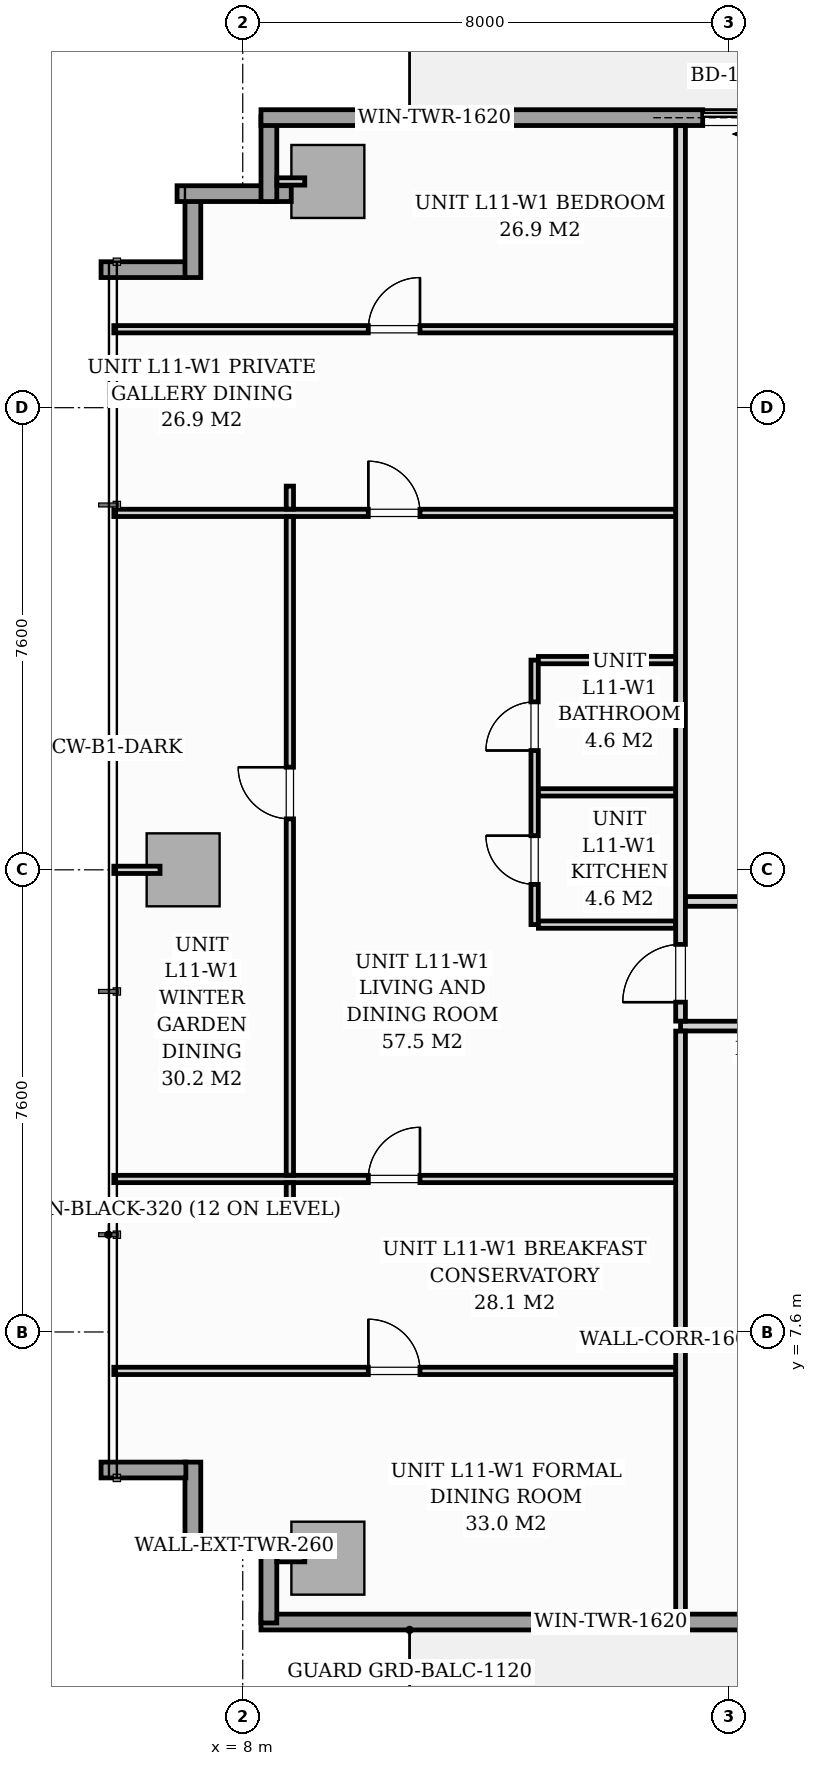
"""IFC4 building model, lengths in metres.
Left out: names, types, materials, properties, quantities, classifications, styles, units other than length and angle.
Written with IfcOpenShell. Run it as: python <this file> out.ifc"""

import sys

from ifc_helpers import new_model, si_unit, direction, frame, frame_2d, origin, origin_2d, place, context, subcontext, project, spatial, rectangle, extrude, source, transform, mapped, element, fill, save


model = new_model("IFC4")
c1 = context("Model", 3, precision=1e-05, world=origin(), true_north=direction((0.0, 1.0)))
c2 = subcontext(c1, "Body", "Model", "MODEL_VIEW")
j1 = project(units=[si_unit("LENGTHUNIT", "METRE"), si_unit("PLANEANGLEUNIT", "RADIAN")], contexts=[c1])
p1 = place(None, origin())
s1 = spatial("IfcSite", under=j1, at=p1, CompositionType="ELEMENT")
p2 = place(p1, origin())
s2 = spatial("IfcBuilding", under=s1, at=p2, CompositionType="ELEMENT")
p3 = place(p2, frame((0.0, 0.0, 42.2)))
s3 = spatial("IfcBuildingStorey", under=s2, at=p3, CompositionType="ELEMENT", Elevation=42.2)
m1 = source(origin(), c2, "Body", "SweptSolid", [
    extrude(rectangle(XDim=1.2, YDim=1.2, at=origin_2d()), origin(), (0.0, 0.0, 1.0), 3.196),
])
for number, where, z_axis, x_axis in (
    (1, (9.4, 3.88, 0.002), (0.0, 0.0, 1.0), (1.0, 0.0, 0.0)),
    (2, (9.4, 26.52, 0.002), (0.0, 0.0, 1.0), (1.0, 0.0, 0.0)),
    (3, (7.02, 15.2, 0.002), (0.0, 0.0, 1.0), (1.0, 0.0, 0.0)),
):
    element("IfcColumn", number, at=place(p3, frame(where, z_axis=z_axis, x_axis=x_axis)), inside=s3, PredefinedType="COLUMN", context=c2, shape_type="MappedRepresentation", body=[
        mapped(m1, transform((0.0, 0.0, 0.0), scale=1.0)),
    ])
p4 = place(p3, frame((8.798, 4.08, 0.0), z_axis=(0.0, 0.0, 1.0), x_axis=(-1.0, 0.0, 0.0)))
e4 = element("IfcWall", 4, at=p4, inside=s3, PredefinedType="STANDARD", context=c2, shape_type="SweptSolid", body=[
    extrude(rectangle(XDim=1.878, YDim=0.26, at=frame_2d((0.939, 0.0))), origin(), (0.0, 0.0, 1.0), 2.94),
])
for number, where, z_axis, x_axis in (
    (5, (7.18, 4.065, 0.0), (0.0, 0.0, 1.0), (0.0, 1.0, 0.0)),
    (6, (7.065, 5.33, 0.0), (0.0, 0.0, 1.0), (-1.0, 0.0, 0.0)),
    (7, (5.67, 25.07, 0.0), (0.0, 0.0, 1.0), (1.0, 0.0, 0.0)),
    (8, (7.18, 24.94, 0.0), (0.0, 0.0, 1.0), (0.0, 1.0, 0.0)),
):
    element("IfcWall", number, at=place(p3, frame(where, z_axis=z_axis, x_axis=x_axis)), inside=s3, PredefinedType="STANDARD", context=c2, shape_type="SweptSolid", body=[
        extrude(rectangle(XDim=1.395, YDim=0.26, at=frame_2d((0.698, 0.0))), origin(), (0.0, 0.0, 1.0), 2.94),
    ])
p5 = place(p3, frame((6.92, 26.32, 0.0), z_axis=(0.0, 0.0, 1.0), x_axis=(1.0, 0.0, 0.0)))
e9 = element("IfcWall", 9, at=p5, inside=s3, PredefinedType="STANDARD", context=c2, shape_type="SweptSolid", body=[
    extrude(rectangle(XDim=1.878, YDim=0.26, at=frame_2d((0.939, 0.0))), origin(), (0.0, 0.0, 1.0), 2.94),
])
p6 = place(p3, frame((8.43, 26.19, 0.0), z_axis=(0.0, 0.0, 1.0), x_axis=(0.0, 1.0, 0.0)))
e10 = element("IfcWall", 10, at=p6, inside=s3, PredefinedType="STANDARD", context=c2, shape_type="SweptSolid", body=[
    extrude(rectangle(XDim=1.395, YDim=0.26, at=frame_2d((0.698, 0.0))), origin(), (0.0, 0.0, 1.0), 2.94),
])
p7 = place(p3, frame((8.3, 27.57, 0.0), z_axis=(0.0, 0.0, 1.0), x_axis=(1.0, 0.0, 0.0)))
e11 = element("IfcWall", 11, at=p7, inside=s3, PredefinedType="STANDARD", context=c2, shape_type="SweptSolid", body=[
    extrude(rectangle(XDim=17.15, YDim=0.26, at=frame_2d((8.575, 0.0))), origin(), (0.0, 0.0, 1.0), 2.94),
])
p8 = place(p7, frame((7.264, 0.0, 0.0)))
e12 = element("IfcOpeningElement", 12, at=p8, cuts=e11, PredefinedType="OPENING", context=c2, shape_type="SweptSolid", body=[
    extrude(rectangle(XDim=1.8, YDim=2.06, at=frame_2d((0.9, 1.03))), frame((0.0, 0.14, 0.0), z_axis=(0.0, -1.0, 0.0), x_axis=(1.0, 0.0, 0.0)), (0.0, 0.0, 1.0), 0.28),
])
p9 = place(p7, frame((2.05, 0.0, 0.65)))
e13 = element("IfcOpeningElement", 13, at=p9, cuts=e11, PredefinedType="OPENING", context=c2, shape_type="SweptSolid", body=[
    extrude(rectangle(XDim=1.6, YDim=1.5, at=frame_2d((0.8, 0.75))), frame((0.0, 0.14, 0.0), z_axis=(0.0, -1.0, 0.0), x_axis=(1.0, 0.0, 0.0)), (0.0, 0.0, 1.0), 0.28),
])
p10 = place(p3, frame((25.45, 2.83, 0.0), z_axis=(0.0, 0.0, 1.0), x_axis=(-1.0, 0.0, 0.0)))
e14 = element("IfcWall", 14, at=p10, inside=s3, PredefinedType="STANDARD", context=c2, shape_type="SweptSolid", body=[
    extrude(rectangle(XDim=17.15, YDim=0.26, at=frame_2d((8.575, 0.0))), origin(), (0.0, 0.0, 1.0), 2.94),
])
p11 = place(p10, frame((6.65, 0.0, 0.0)))
e15 = element("IfcOpeningElement", 15, at=p11, cuts=e14, PredefinedType="OPENING", context=c2, shape_type="SweptSolid", body=[
    extrude(rectangle(XDim=1.8, YDim=2.06, at=frame_2d((0.9, 1.03))), frame((0.0, 0.14, 0.0), z_axis=(0.0, -1.0, 0.0), x_axis=(1.0, 0.0, 0.0)), (0.0, 0.0, 1.0), 0.28),
])
p12 = place(p10, frame((10.6, 0.0, 0.65)))
e16 = element("IfcOpeningElement", 16, at=p12, cuts=e14, PredefinedType="OPENING", context=c2, shape_type="SweptSolid", body=[
    extrude(rectangle(XDim=1.6, YDim=1.5, at=frame_2d((0.8, 0.75))), frame((0.0, 0.14, 0.0), z_axis=(0.0, -1.0, 0.0), x_axis=(1.0, 0.0, 0.0)), (0.0, 0.0, 1.0), 0.28),
])
p13 = place(p10, frame((0.413, 0.0, 0.75)))
e17 = element("IfcOpeningElement", 17, at=p13, cuts=e14, PredefinedType="OPENING", context=c2, shape_type="SweptSolid", body=[
    extrude(rectangle(XDim=1.6, YDim=1.5, at=frame_2d((0.8, 0.75))), frame((0.0, 0.14, 0.0), z_axis=(0.0, -1.0, 0.0), x_axis=(1.0, 0.0, 0.0)), (0.0, 0.0, 1.0), 0.28),
])
p14 = place(p3, frame((8.43, 2.815, 0.0), z_axis=(0.0, 0.0, 1.0), x_axis=(0.0, 1.0, 0.0)))
e18 = element("IfcWall", 18, at=p14, inside=s3, PredefinedType="STANDARD", context=c2, shape_type="SweptSolid", body=[
    extrude(rectangle(XDim=1.395, YDim=0.26, at=frame_2d((0.698, 0.0))), origin(), (0.0, 0.0, 1.0), 2.94),
])
p15 = place(p3, frame((15.2, 12.63, 0.0), z_axis=(0.0, 0.0, 1.0), x_axis=(1.0, 0.0, 0.0)))
e19 = element("IfcWall", 19, at=p15, inside=s3, PredefinedType="PARTITIONING", context=c2, shape_type="SweptSolid", body=[
    extrude(rectangle(XDim=37.1, YDim=0.16, at=frame_2d((18.55, 0.0))), origin(), (0.0, 0.0, 1.0), 2.94),
])
p16 = place(p15, frame((1.572, 0.0, 0.0)))
e20 = element("IfcOpeningElement", 20, at=p16, cuts=e19, PredefinedType="OPENING", context=c2, shape_type="SweptSolid", body=[
    extrude(rectangle(XDim=0.95, YDim=2.06, at=frame_2d((0.475, 1.03))), frame((0.0, 0.09, 0.0), z_axis=(0.0, -1.0, 0.0), x_axis=(1.0, 0.0, 0.0)), (0.0, 0.0, 1.0), 0.18),
])
p17 = place(p15, frame((14.877, 0.0, 0.0)))
e21 = element("IfcOpeningElement", 21, at=p17, cuts=e19, PredefinedType="OPENING", context=c2, shape_type="SweptSolid", body=[
    extrude(rectangle(XDim=0.95, YDim=2.06, at=frame_2d((0.475, 1.03))), frame((0.0, 0.09, 0.0), z_axis=(0.0, -1.0, 0.0), x_axis=(1.0, 0.0, 0.0)), (0.0, 0.0, 1.0), 0.18),
])
p18 = place(p15, frame((28.476, 0.0, 0.0)))
e22 = element("IfcOpeningElement", 22, at=p18, cuts=e19, PredefinedType="OPENING", context=c2, shape_type="SweptSolid", body=[
    extrude(rectangle(XDim=0.95, YDim=2.06, at=frame_2d((0.475, 1.03))), frame((0.0, 0.09, 0.0), z_axis=(0.0, -1.0, 0.0), x_axis=(1.0, 0.0, 0.0)), (0.0, 0.0, 1.0), 0.18),
])
p19 = place(p3, frame((15.2, 2.962, 0.0), z_axis=(0.0, 0.0, 1.0), x_axis=(0.0, 1.0, 0.0)))
e23 = element("IfcWall", 23, at=p19, inside=s3, PredefinedType="PARTITIONING", context=c2, shape_type="SweptSolid", body=[
    extrude(rectangle(XDim=9.586, YDim=0.16, at=frame_2d((4.793, 0.0))), origin(), (0.0, 0.0, 1.0), 2.94),
])
p20 = place(p3, frame((15.2, 12.712, 0.0), z_axis=(0.0, 0.0, 1.0), x_axis=(0.0, 1.0, 0.0)))
e24 = element("IfcWall", 24, at=p20, inside=s3, PredefinedType="PARTITIONING", context=c2, shape_type="SweptSolid", body=[
    extrude(rectangle(XDim=14.726, YDim=0.16, at=frame_2d((7.363, 0.0))), origin(), (0.0, 0.0, 1.0), 2.94),
])
p21 = place(p20, frame((0.312, 0.0, 0.0)))
e25 = element("IfcOpeningElement", 25, at=p21, cuts=e24, PredefinedType="OPENING", context=c2, shape_type="SweptSolid", body=[
    extrude(rectangle(XDim=0.95, YDim=2.06, at=frame_2d((0.475, 1.03))), frame((0.0, 0.09, 0.0), z_axis=(0.0, -1.0, 0.0), x_axis=(1.0, 0.0, 0.0)), (0.0, 0.0, 1.0), 0.18),
])
p22 = place(p3, frame((12.8, 14.299, 0.0), z_axis=(0.0, 0.0, 1.0), x_axis=(0.0, 1.0, 0.0)))
e26 = element("IfcWall", 26, at=p22, inside=s3, PredefinedType="PARTITIONING", context=c2, shape_type="SweptSolid", body=[
    extrude(rectangle(XDim=4.35, YDim=0.12, at=frame_2d((2.175, 0.0))), origin(), (0.0, 0.0, 1.0), 2.94),
])
p23 = place(p22, frame((0.662, 0.0, 0.0)))
e27 = element("IfcOpeningElement", 27, at=p23, cuts=e26, PredefinedType="OPENING", context=c2, shape_type="SweptSolid", body=[
    extrude(rectangle(XDim=0.8, YDim=2.0, at=frame_2d((0.4, 1.0))), frame((0.0, 0.07, 0.0), z_axis=(0.0, -1.0, 0.0), x_axis=(1.0, 0.0, 0.0)), (0.0, 0.0, 1.0), 0.14),
])
p24 = place(p22, frame((2.863, 0.0, 0.0)))
e28 = element("IfcOpeningElement", 28, at=p24, cuts=e26, PredefinedType="OPENING", context=c2, shape_type="SweptSolid", body=[
    extrude(rectangle(XDim=0.8, YDim=2.02, at=frame_2d((0.4, 1.01))), frame((0.0, 0.07, 0.0), z_axis=(0.0, -1.0, 0.0), x_axis=(1.0, 0.0, 0.0)), (0.0, 0.0, 1.0), 0.14),
])
for number, where, z_axis, x_axis in (
    (29, (12.862, 16.474, 0.0), (0.0, 0.0, 1.0), (1.0, 0.0, 0.0)),
    (30, (12.862, 14.299, 0.0), (0.0, 0.0, 1.0), (1.0, 0.0, 0.0)),
    (31, (12.862, 18.649, 0.0), (0.0, 0.0, 1.0), (1.0, 0.0, 0.0)),
):
    element("IfcWall", number, at=place(p3, frame(where, z_axis=z_axis, x_axis=x_axis)), inside=s3, PredefinedType="PARTITIONING", context=c2, shape_type="SweptSolid", body=[
        extrude(rectangle(XDim=2.256, YDim=0.12, at=frame_2d((1.128, 0.0))), origin(), (0.0, 0.0, 1.0), 2.94),
    ])
p25 = place(p3, frame((5.88, 24.09, 0.0), z_axis=(0.0, 0.0, 1.0), x_axis=(1.0, 0.0, 0.0)))
e32 = element("IfcWall", 32, at=p25, inside=s3, PredefinedType="PARTITIONING", context=c2, shape_type="SweptSolid", body=[
    extrude(rectangle(XDim=9.238, YDim=0.12, at=frame_2d((4.619, 0.0))), origin(), (0.0, 0.0, 1.0), 2.94),
])
p26 = place(p25, frame((4.185, 0.0, 0.0)))
e33 = element("IfcOpeningElement", 33, at=p26, cuts=e32, PredefinedType="OPENING", context=c2, shape_type="SweptSolid", body=[
    extrude(rectangle(XDim=0.85, YDim=2.05, at=frame_2d((0.425, 1.025))), frame((0.0, 0.07, 0.0), z_axis=(0.0, -1.0, 0.0), x_axis=(1.0, 0.0, 0.0)), (0.0, 0.0, 1.0), 0.14),
])
p27 = place(p3, frame((5.88, 6.96, 0.0), z_axis=(0.0, 0.0, 1.0), x_axis=(1.0, 0.0, 0.0)))
e34 = element("IfcWall", 34, at=p27, inside=s3, PredefinedType="PARTITIONING", context=c2, shape_type="SweptSolid", body=[
    extrude(rectangle(XDim=9.238, YDim=0.12, at=frame_2d((4.619, 0.0))), origin(), (0.0, 0.0, 1.0), 2.94),
])
p28 = place(p27, frame((4.185, 0.0, 0.0)))
e35 = element("IfcOpeningElement", 35, at=p28, cuts=e34, PredefinedType="OPENING", context=c2, shape_type="SweptSolid", body=[
    extrude(rectangle(XDim=0.85, YDim=2.05, at=frame_2d((0.425, 1.025))), frame((0.0, 0.07, 0.0), z_axis=(0.0, -1.0, 0.0), x_axis=(1.0, 0.0, 0.0)), (0.0, 0.0, 1.0), 0.14),
])
p29 = place(p3, frame((5.88, 10.116, 0.0), z_axis=(0.0, 0.0, 1.0), x_axis=(1.0, 0.0, 0.0)))
e36 = element("IfcWall", 36, at=p29, inside=s3, PredefinedType="PARTITIONING", context=c2, shape_type="SweptSolid", body=[
    extrude(rectangle(XDim=9.238, YDim=0.12, at=frame_2d((4.619, 0.0))), origin(), (0.0, 0.0, 1.0), 2.94),
])
p30 = place(p29, frame((4.185, 0.0, 0.0)))
e37 = element("IfcOpeningElement", 37, at=p30, cuts=e36, PredefinedType="OPENING", context=c2, shape_type="SweptSolid", body=[
    extrude(rectangle(XDim=0.85, YDim=2.05, at=frame_2d((0.425, 1.025))), frame((0.0, 0.07, 0.0), z_axis=(0.0, -1.0, 0.0), x_axis=(1.0, 0.0, 0.0)), (0.0, 0.0, 1.0), 0.14),
])
p31 = place(p3, frame((5.88, 21.07, 0.0), z_axis=(0.0, 0.0, 1.0), x_axis=(1.0, 0.0, 0.0)))
e38 = element("IfcWall", 38, at=p31, inside=s3, PredefinedType="PARTITIONING", context=c2, shape_type="SweptSolid", body=[
    extrude(rectangle(XDim=9.238, YDim=0.12, at=frame_2d((4.619, 0.0))), origin(), (0.0, 0.0, 1.0), 2.94),
])
p32 = place(p31, frame((4.185, 0.0, 0.0)))
e39 = element("IfcOpeningElement", 39, at=p32, cuts=e38, PredefinedType="OPENING", context=c2, shape_type="SweptSolid", body=[
    extrude(rectangle(XDim=0.85, YDim=2.05, at=frame_2d((0.425, 1.025))), frame((0.0, 0.07, 0.0), z_axis=(0.0, -1.0, 0.0), x_axis=(1.0, 0.0, 0.0)), (0.0, 0.0, 1.0), 0.14),
])
p33 = place(p3, frame((8.775, 9.676, 0.0), z_axis=(0.0, 0.0, 1.0), x_axis=(0.0, 1.0, 0.0)))
e40 = element("IfcWall", 40, at=p33, inside=s3, PredefinedType="PARTITIONING", context=c2, shape_type="SweptSolid", body=[
    extrude(rectangle(XDim=0.378, YDim=0.12, at=frame_2d((0.189, 0.0))), origin(), (0.0, 0.0, 1.0), 2.94),
])
p34 = place(p3, frame((8.775, 10.178, 0.0), z_axis=(0.0, 0.0, 1.0), x_axis=(0.0, 1.0, 0.0)))
e41 = element("IfcWall", 41, at=p34, inside=s3, PredefinedType="PARTITIONING", context=c2, shape_type="SweptSolid", body=[
    extrude(rectangle(XDim=10.83, YDim=0.12, at=frame_2d((5.415, 0.0))), origin(), (0.0, 0.0, 1.0), 2.94),
])
p35 = place(p34, frame((5.86, 0.0, 0.0)))
e42 = element("IfcOpeningElement", 42, at=p35, cuts=e41, PredefinedType="OPENING", context=c2, shape_type="SweptSolid", body=[
    extrude(rectangle(XDim=0.85, YDim=2.05, at=frame_2d((0.425, 1.025))), frame((0.0, 0.07, 0.0), z_axis=(0.0, -1.0, 0.0), x_axis=(1.0, 0.0, 0.0)), (0.0, 0.0, 1.0), 0.14),
])
p36 = place(p3, frame((8.775, 21.132, 0.0), z_axis=(0.0, 0.0, 1.0), x_axis=(0.0, 1.0, 0.0)))
e43 = element("IfcWall", 43, at=p36, inside=s3, PredefinedType="PARTITIONING", context=c2, shape_type="SweptSolid", body=[
    extrude(rectangle(XDim=0.378, YDim=0.12, at=frame_2d((0.189, 0.0))), origin(), (0.0, 0.0, 1.0), 2.94),
])
p37 = place(p3, frame((15.282, 14.68, 0.0), z_axis=(0.0, 0.0, 1.0), x_axis=(1.0, 0.0, 0.0)))
e44 = element("IfcWall", 44, at=p37, inside=s3, PredefinedType="PARTITIONING", context=c2, shape_type="SweptSolid", body=[
    extrude(rectangle(XDim=10.878, YDim=0.16, at=frame_2d((5.439, 0.0))), origin(), (0.0, 0.0, 1.0), 2.94),
])
p38 = place(p37, frame((4.863, 0.0, 0.0)))
e45 = element("IfcOpeningElement", 45, at=p38, cuts=e44, PredefinedType="OPENING", context=c2, shape_type="SweptSolid", body=[
    extrude(rectangle(XDim=0.95, YDim=2.06, at=frame_2d((0.475, 1.03))), frame((0.0, 0.09, 0.0), z_axis=(0.0, -1.0, 0.0), x_axis=(1.0, 0.0, 0.0)), (0.0, 0.0, 1.0), 0.18),
])
for number, where, z_axis, x_axis in (
    (46, (9.02, 3.88, 0.0), (0.0, 0.0, 1.0), (-1.0, 0.0, 0.0)),
    (47, (9.02, 26.52, 0.0), (0.0, 0.0, 1.0), (-1.0, 0.0, 0.0)),
):
    element("IfcWall", number, at=place(p3, frame(where, z_axis=z_axis, x_axis=x_axis)), inside=s3, PredefinedType="PARTITIONING", context=c2, shape_type="SweptSolid", body=[
        extrude(rectangle(XDim=0.458, YDim=0.12, at=frame_2d((0.229, 0.0))), origin(), (0.0, 0.0, 1.0), 2.94),
    ])
p39 = place(p3, frame((6.64, 15.2, 0.0), z_axis=(0.0, 0.0, 1.0), x_axis=(-1.0, 0.0, 0.0)))
e48 = element("IfcWall", 48, at=p39, inside=s3, PredefinedType="PARTITIONING", context=c2, shape_type="SweptSolid", body=[
    extrude(rectangle(XDim=0.76, YDim=0.12, at=frame_2d((0.38, 0.0))), origin(), (0.0, 0.0, 1.0), 2.94),
])
m2 = source(origin(), c2, "Body", "SweptSolid", [
    extrude(rectangle(XDim=1.8, YDim=2.06, at=frame_2d((0.9, 1.03))), frame((0.0, 0.025, 0.0), z_axis=(0.0, -1.0, 0.0), x_axis=(1.0, 0.0, 0.0)), (0.0, 0.0, 1.0), 0.05),
])
p40 = place(p8, origin())
e49 = element("IfcDoor", 49, at=p40, inside=s3, OperationType="SLIDING_TO_LEFT", PredefinedType="DOOR", context=c2, shape_type="MappedRepresentation", body=[
    mapped(m2, transform((0.0, 0.0, 0.0), scale=1.0)),
])
fill(e12, e49)
m3 = source(origin(), c2, "Body", "SweptSolid", [
    extrude(rectangle(XDim=1.6, YDim=1.5, at=frame_2d((0.8, 0.75))), frame((0.0, 0.03, 0.0), z_axis=(0.0, -1.0, 0.0), x_axis=(1.0, 0.0, 0.0)), (0.0, 0.0, 1.0), 0.06),
])
p41 = place(p9, origin())
e50 = element("IfcWindow", 50, at=p41, inside=s3, PartitioningType="SINGLE_PANEL", PredefinedType="WINDOW", context=c2, shape_type="MappedRepresentation", body=[
    mapped(m3, transform((0.0, 0.0, 0.0), scale=1.0)),
])
fill(e13, e50)
p42 = place(p12, origin())
e51 = element("IfcWindow", 51, at=p42, inside=s3, PartitioningType="SINGLE_PANEL", PredefinedType="WINDOW", context=c2, shape_type="MappedRepresentation", body=[
    mapped(m3, transform((0.0, 0.0, 0.0), scale=1.0)),
])
fill(e16, e51)
m4 = source(origin(), c2, "Body", "SweptSolid", [
    extrude(rectangle(XDim=0.95, YDim=2.06, at=frame_2d((0.475, 1.03))), frame((0.0, 0.025, 0.0), z_axis=(0.0, -1.0, 0.0), x_axis=(1.0, 0.0, 0.0)), (0.0, 0.0, 1.0), 0.05),
])
p43 = place(p21, origin())
e52 = element("IfcDoor", 52, at=p43, inside=s3, OperationType="SINGLE_SWING_LEFT", PredefinedType="DOOR", context=c2, shape_type="MappedRepresentation", body=[
    mapped(m4, transform((0.0, 0.0, 0.0), scale=1.0)),
])
fill(e25, e52)
m5 = source(origin(), c2, "Body", "SweptSolid", [
    extrude(rectangle(XDim=0.8, YDim=2.0, at=frame_2d((0.4, 1.0))), frame((0.0, 0.025, 0.0), z_axis=(0.0, -1.0, 0.0), x_axis=(1.0, 0.0, 0.0)), (0.0, 0.0, 1.0), 0.05),
])
p44 = place(p23, origin())
e53 = element("IfcDoor", 53, at=p44, inside=s3, OperationType="SINGLE_SWING_RIGHT", PredefinedType="DOOR", context=c2, shape_type="MappedRepresentation", body=[
    mapped(m5, transform((0.0, 0.0, 0.0), scale=1.0)),
])
fill(e27, e53)
m6 = source(origin(), c2, "Body", "SweptSolid", [
    extrude(rectangle(XDim=0.8, YDim=2.02, at=frame_2d((0.4, 1.01))), frame((0.0, 0.025, 0.0), z_axis=(0.0, -1.0, 0.0), x_axis=(1.0, 0.0, 0.0)), (0.0, 0.0, 1.0), 0.05),
])
p45 = place(p24, origin())
e54 = element("IfcDoor", 54, at=p45, inside=s3, OperationType="SINGLE_SWING_LEFT", PredefinedType="DOOR", context=c2, shape_type="MappedRepresentation", body=[
    mapped(m6, transform((0.0, 0.0, 0.0), scale=1.0)),
])
fill(e28, e54)
m7 = source(origin(), c2, "Body", "SweptSolid", [
    extrude(rectangle(XDim=0.85, YDim=2.05, at=frame_2d((0.425, 1.025))), frame((0.0, 0.025, 0.0), z_axis=(0.0, -1.0, 0.0), x_axis=(1.0, 0.0, 0.0)), (0.0, 0.0, 1.0), 0.05),
])
p46 = place(p26, origin())
e55 = element("IfcDoor", 55, at=p46, inside=s3, OperationType="SINGLE_SWING_RIGHT", PredefinedType="DOOR", context=c2, shape_type="MappedRepresentation", body=[
    mapped(m7, transform((0.0, 0.0, 0.0), scale=1.0)),
])
fill(e33, e55)
p47 = place(p28, origin())
e56 = element("IfcDoor", 56, at=p47, inside=s3, OperationType="SINGLE_SWING_LEFT", PredefinedType="DOOR", context=c2, shape_type="MappedRepresentation", body=[
    mapped(m7, transform((0.0, 0.0, 0.0), scale=1.0)),
])
fill(e35, e56)
p48 = place(p30, origin())
e57 = element("IfcDoor", 57, at=p48, inside=s3, OperationType="SINGLE_SWING_RIGHT", PredefinedType="DOOR", context=c2, shape_type="MappedRepresentation", body=[
    mapped(m7, transform((0.0, 0.0, 0.0), scale=1.0)),
])
fill(e37, e57)
p49 = place(p32, origin())
e58 = element("IfcDoor", 58, at=p49, inside=s3, OperationType="SINGLE_SWING_LEFT", PredefinedType="DOOR", context=c2, shape_type="MappedRepresentation", body=[
    mapped(m7, transform((0.0, 0.0, 0.0), scale=1.0)),
])
fill(e39, e58)
p50 = place(p35, origin())
e59 = element("IfcDoor", 59, at=p50, inside=s3, OperationType="SINGLE_SWING_RIGHT", PredefinedType="DOOR", context=c2, shape_type="MappedRepresentation", body=[
    mapped(m7, transform((0.0, 0.0, 0.0), scale=1.0)),
])
fill(e42, e59)
save(model, sys.argv[1])
